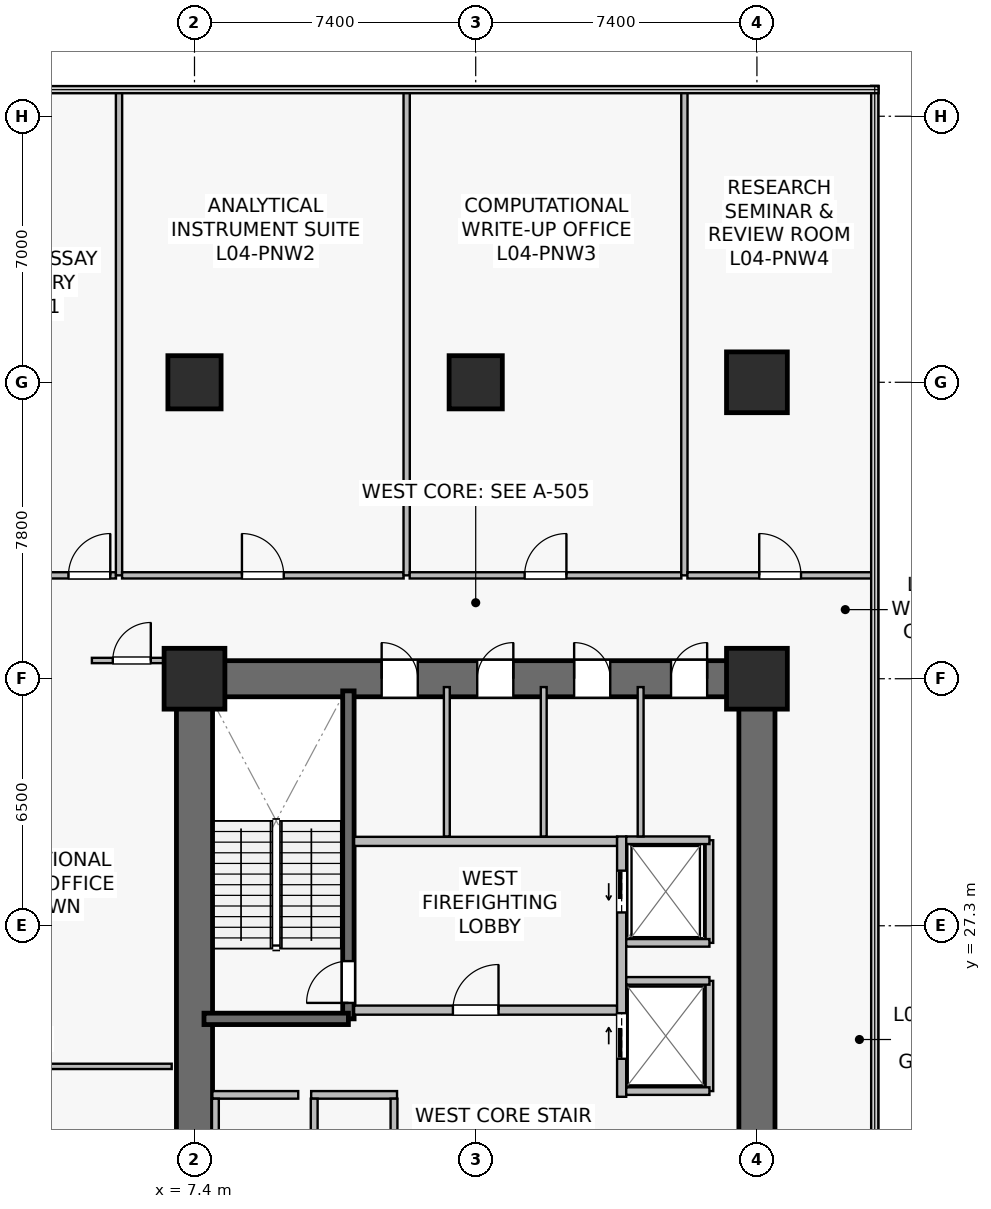
"""IFC4 building model, lengths in metres.
Left out: names, types, materials, properties, quantities, classifications, styles, units other than length and angle.
Written with IfcOpenShell. Run it as: python <this file> out.ifc"""

import sys

from ifc_helpers import new_model, si_unit, direction, frame, frame_2d, origin, origin_2d, place, context, subcontext, project, spatial, rectangle, extrude, source, transform, mapped, element, fill, save


model = new_model("IFC4")
c1 = context("Model", 3, precision=1e-05, world=origin(), true_north=direction((0.0, 1.0)))
c2 = subcontext(c1, "Body", "Model", "MODEL_VIEW")
j1 = project(units=[si_unit("LENGTHUNIT", "METRE"), si_unit("PLANEANGLEUNIT", "RADIAN")], contexts=[c1])
p1 = place(None, origin())
s1 = spatial("IfcSite", under=j1, at=p1, CompositionType="ELEMENT")
p2 = place(p1, origin())
s2 = spatial("IfcBuilding", under=s1, at=p2, CompositionType="ELEMENT")
p3 = place(p2, frame((0.0, 0.0, 15.0)))
s3 = spatial("IfcBuildingStorey", under=s2, at=p3, CompositionType="ELEMENT", Elevation=15.0)
p4 = place(p3, frame((6.925, 33.8, 0.0), z_axis=(0.0, 0.0, 1.0), x_axis=(1.0, 0.0, 0.0)))
e1 = element("IfcWall", 1, at=p4, inside=s3, PredefinedType="SHEAR", context=c2, shape_type="SweptSolid", body=[
    extrude(rectangle(XDim=15.75, YDim=0.95, at=frame_2d((7.875, 0.0))), origin(), (0.0, 0.0, 1.0), 4.45),
])
p5 = place(p4, frame((5.4, 0.0, 0.0)))
e2 = element("IfcOpeningElement", 2, at=p5, cuts=e1, PredefinedType="OPENING", context=c2, shape_type="SweptSolid", body=[
    extrude(rectangle(XDim=0.95, YDim=2.15, at=frame_2d((0.475, 1.075))), frame((0.0, 0.485, 0.0), z_axis=(0.0, -1.0, 0.0), x_axis=(1.0, 0.0, 0.0)), (0.0, 0.0, 1.0), 0.97),
])
p6 = place(p4, frame((7.915, 0.0, 0.0)))
e3 = element("IfcOpeningElement", 3, at=p6, cuts=e1, PredefinedType="OPENING", context=c2, shape_type="SweptSolid", body=[
    extrude(rectangle(XDim=0.95, YDim=2.15, at=frame_2d((0.475, 1.075))), frame((0.0, 0.485, 0.0), z_axis=(0.0, -1.0, 0.0), x_axis=(1.0, 0.0, 0.0)), (0.0, 0.0, 1.0), 0.97),
])
p7 = place(p4, frame((10.465, 0.0, 0.0)))
e4 = element("IfcOpeningElement", 4, at=p7, cuts=e1, PredefinedType="OPENING", context=c2, shape_type="SweptSolid", body=[
    extrude(rectangle(XDim=0.95, YDim=2.15, at=frame_2d((0.475, 1.075))), frame((0.0, 0.485, 0.0), z_axis=(0.0, -1.0, 0.0), x_axis=(1.0, 0.0, 0.0)), (0.0, 0.0, 1.0), 0.97),
])
p8 = place(p4, frame((13.015, 0.0, 0.0)))
e5 = element("IfcOpeningElement", 5, at=p8, cuts=e1, PredefinedType="OPENING", context=c2, shape_type="SweptSolid", body=[
    extrude(rectangle(XDim=0.95, YDim=2.15, at=frame_2d((0.475, 1.075))), frame((0.0, 0.485, 0.0), z_axis=(0.0, -1.0, 0.0), x_axis=(1.0, 0.0, 0.0)), (0.0, 0.0, 1.0), 0.97),
])
p9 = place(p3, frame((7.4, 15.275, 0.0), z_axis=(0.0, 0.0, 1.0), x_axis=(0.0, 1.0, 0.0)))
e6 = element("IfcWall", 6, at=p9, inside=s3, PredefinedType="SHEAR", context=c2, shape_type="SweptSolid", body=[
    extrude(rectangle(XDim=18.05, YDim=0.95, at=frame_2d((9.025, 0.0))), origin(), (0.0, 0.0, 1.0), 4.45),
])
p10 = place(p3, frame((22.2, 15.275, 0.0), z_axis=(0.0, 0.0, 1.0), x_axis=(0.0, 1.0, 0.0)))
e7 = element("IfcWall", 7, at=p10, inside=s3, PredefinedType="SHEAR", context=c2, shape_type="SweptSolid", body=[
    extrude(rectangle(XDim=18.05, YDim=0.95, at=frame_2d((9.025, 0.0))), origin(), (0.0, 0.0, 1.0), 4.45),
])
p11 = place(p10, frame((3.275, 0.0, 0.0)))
e8 = element("IfcOpeningElement", 8, at=p11, cuts=e7, PredefinedType="OPENING", context=c2, shape_type="SweptSolid", body=[
    extrude(rectangle(XDim=1.42, YDim=2.2, at=frame_2d((0.71, 1.1))), frame((0.0, 0.485, 0.0), z_axis=(0.0, -1.0, 0.0), x_axis=(1.0, 0.0, 0.0)), (0.0, 0.0, 1.0), 0.97),
])
p12 = place(p3, frame((11.45, 24.85, 0.0), z_axis=(0.0, 0.0, 1.0), x_axis=(0.0, 1.0, 0.0)))
e9 = element("IfcWall", 9, at=p12, inside=s3, PredefinedType="SHEAR", context=c2, shape_type="SweptSolid", body=[
    extrude(rectangle(XDim=8.63, YDim=0.3, at=frame_2d((4.315, 0.0))), origin(), (0.0, 0.0, 1.0), 4.45),
])
p13 = place(p12, frame((0.42, 0.0, 0.0)))
e10 = element("IfcOpeningElement", 10, at=p13, cuts=e9, PredefinedType="OPENING", context=c2, shape_type="SweptSolid", body=[
    extrude(rectangle(XDim=1.1, YDim=2.15, at=frame_2d((0.55, 1.075))), frame((0.0, 0.16, 0.0), z_axis=(0.0, -1.0, 0.0), x_axis=(1.0, 0.0, 0.0)), (0.0, 0.0, 1.0), 0.32),
])
p14 = place(p3, frame((7.65, 24.85, 0.0), z_axis=(0.0, 0.0, 1.0), x_axis=(1.0, 0.0, 0.0)))
e11 = element("IfcWall", 11, at=p14, inside=s3, PredefinedType="SHEAR", context=c2, shape_type="SweptSolid", body=[
    extrude(rectangle(XDim=3.8, YDim=0.3, at=frame_2d((1.9, 0.0))), origin(), (0.0, 0.0, 1.0), 4.45),
])
m1 = source(origin(), c2, "Body", "SweptSolid", [
    extrude(rectangle(XDim=1.6, YDim=1.6, at=origin_2d()), origin(), (0.0, 0.0, 1.0), 4.8),
])
for number, where, z_axis, x_axis in (
    (12, (7.4, 33.8, 0.0), (0.0, 0.0, 1.0), (1.0, 0.0, 0.0)),
    (13, (22.2, 33.8, 0.0), (0.0, 0.0, 1.0), (1.0, 0.0, 0.0)),
):
    element("IfcColumn", number, at=place(p3, frame(where, z_axis=z_axis, x_axis=x_axis)), inside=s3, PredefinedType="COLUMN", context=c2, shape_type="MappedRepresentation", body=[
        mapped(m1, transform((0.0, 0.0, 0.0), scale=1.0)),
    ])
m2 = source(origin(), c2, "Body", "SweptSolid", [
    extrude(rectangle(XDim=1.4, YDim=1.4, at=origin_2d()), origin(), (0.0, 0.0, 1.0), 4.8),
])
p15 = place(p3, frame((14.8, 41.6, 0.0), z_axis=(0.0, 0.0, 1.0), x_axis=(1.0, 0.0, 0.0)))
e14 = element("IfcColumn", 14, at=p15, inside=s3, PredefinedType="COLUMN", context=c2, shape_type="MappedRepresentation", body=[
    mapped(m2, transform((0.0, 0.0, 0.0), scale=1.0)),
])
p16 = place(p3, frame((22.2, 41.6, 0.0), z_axis=(0.0, 0.0, 1.0), x_axis=(1.0, 0.0, 0.0)))
e15 = element("IfcColumn", 15, at=p16, inside=s3, PredefinedType="COLUMN", context=c2, shape_type="MappedRepresentation", body=[
    mapped(m1, transform((0.0, 0.0, 0.0), scale=1.0)),
])
p17 = place(p3, frame((7.4, 41.6, 0.0), z_axis=(0.0, 0.0, 1.0), x_axis=(1.0, 0.0, 0.0)))
e16 = element("IfcColumn", 16, at=p17, inside=s3, PredefinedType="COLUMN", context=c2, shape_type="MappedRepresentation", body=[
    mapped(m2, transform((0.0, 0.0, 0.0), scale=1.0)),
])
p18 = place(p3, frame((11.6, 25.08, 0.0), z_axis=(0.0, 0.0, 1.0), x_axis=(1.0, 0.0, 0.0)))
e17 = element("IfcWall", 17, at=p18, inside=s3, PredefinedType="SOLIDWALL", context=c2, shape_type="SweptSolid", body=[
    extrude(rectangle(XDim=6.92, YDim=0.24, at=frame_2d((3.46, 0.0))), origin(), (0.0, 0.0, 1.0), 3.735),
])
p19 = place(p18, frame((2.6, 0.0, 0.0)))
e18 = element("IfcOpeningElement", 18, at=p19, cuts=e17, PredefinedType="OPENING", context=c2, shape_type="SweptSolid", body=[
    extrude(rectangle(XDim=1.2, YDim=2.16, at=frame_2d((0.6, 1.08))), frame((0.0, 0.13, 0.0), z_axis=(0.0, -1.0, 0.0), x_axis=(1.0, 0.0, 0.0)), (0.0, 0.0, 1.0), 0.26),
])
p20 = place(p3, frame((11.6, 29.52, 0.0), z_axis=(0.0, 0.0, 1.0), x_axis=(1.0, 0.0, 0.0)))
e19 = element("IfcWall", 19, at=p20, inside=s3, PredefinedType="SOLIDWALL", context=c2, shape_type="SweptSolid", body=[
    extrude(rectangle(XDim=6.92, YDim=0.24, at=frame_2d((3.46, 0.0))), origin(), (0.0, 0.0, 1.0), 3.735),
])
p21 = place(p3, frame((18.64, 22.8, 0.0), z_axis=(0.0, 0.0, 1.0), x_axis=(0.0, 1.0, 0.0)))
e20 = element("IfcWall", 20, at=p21, inside=s3, PredefinedType="SOLIDWALL", context=c2, shape_type="SweptSolid", body=[
    extrude(rectangle(XDim=6.85, YDim=0.24, at=frame_2d((3.425, 0.0))), origin(), (0.0, 0.0, 1.0), 3.535),
])
p22 = place(p21, frame((4.85, 0.0, 0.0)))
e21 = element("IfcOpeningElement", 21, at=p22, cuts=e20, PredefinedType="OPENING", context=c2, shape_type="SweptSolid", body=[
    extrude(rectangle(XDim=1.1, YDim=2.22, at=frame_2d((0.55, 1.11))), frame((0.0, 0.13, 0.0), z_axis=(0.0, -1.0, 0.0), x_axis=(1.0, 0.0, 0.0)), (0.0, 0.0, 1.0), 0.26),
])
p23 = place(p21, frame((1.0, 0.0, 0.0)))
e22 = element("IfcOpeningElement", 22, at=p23, cuts=e20, PredefinedType="OPENING", context=c2, shape_type="SweptSolid", body=[
    extrude(rectangle(XDim=1.2, YDim=2.22, at=frame_2d((0.6, 1.11))), frame((0.0, 0.13, 0.0), z_axis=(0.0, -1.0, 0.0), x_axis=(1.0, 0.0, 0.0)), (0.0, 0.0, 1.0), 0.26),
])
p24 = place(p3, frame((7.87, 22.85, 0.0), z_axis=(0.0, 0.0, 1.0), x_axis=(1.0, 0.0, 0.0)))
e23 = element("IfcWall", 23, at=p24, inside=s3, PredefinedType="SOLIDWALL", context=c2, shape_type="SweptSolid", body=[
    extrude(rectangle(XDim=2.26, YDim=0.2, at=frame_2d((1.13, 0.0))), origin(), (0.0, 0.0, 1.0), 4.45),
])
p25 = place(p3, frame((7.95, 20.85, 0.0), z_axis=(0.0, 0.0, 1.0), x_axis=(0.0, 1.0, 0.0)))
e24 = element("IfcWall", 24, at=p25, inside=s3, PredefinedType="SOLIDWALL", context=c2, shape_type="SweptSolid", body=[
    extrude(rectangle(XDim=1.9, YDim=0.18, at=frame_2d((0.95, 0.0))), origin(), (0.0, 0.0, 1.0), 4.45),
])
p26 = place(p3, frame((10.47, 22.85, 0.0), z_axis=(0.0, 0.0, 1.0), x_axis=(1.0, 0.0, 0.0)))
e25 = element("IfcWall", 25, at=p26, inside=s3, PredefinedType="SOLIDWALL", context=c2, shape_type="SweptSolid", body=[
    extrude(rectangle(XDim=2.26, YDim=0.2, at=frame_2d((1.13, 0.0))), origin(), (0.0, 0.0, 1.0), 4.45),
])
for number, where, z_axis, x_axis in (
    (26, (10.55, 20.85, 0.0), (0.0, 0.0, 1.0), (0.0, 1.0, 0.0)),
    (27, (12.65, 20.85, 0.0), (0.0, 0.0, 1.0), (0.0, 1.0, 0.0)),
):
    element("IfcWall", number, at=place(p3, frame(where, z_axis=z_axis, x_axis=x_axis)), inside=s3, PredefinedType="SOLIDWALL", context=c2, shape_type="SweptSolid", body=[
        extrude(rectangle(XDim=1.9, YDim=0.18, at=frame_2d((0.95, 0.0))), origin(), (0.0, 0.0, 1.0), 4.45),
    ])
p27 = place(p3, frame((20.95, 26.85, 0.0), z_axis=(0.0, 0.0, 1.0), x_axis=(0.0, 1.0, 0.0)))
e28 = element("IfcWall", 28, at=p27, inside=s3, PredefinedType="SOLIDWALL", context=c2, shape_type="SweptSolid", body=[
    extrude(rectangle(XDim=2.7, YDim=0.2, at=frame_2d((1.35, 0.0))), origin(), (0.0, 0.0, 1.0), 4.45),
])
p28 = place(p3, frame((18.76, 29.55, 0.0), z_axis=(0.0, 0.0, 1.0), x_axis=(1.0, 0.0, 0.0)))
e29 = element("IfcWall", 29, at=p28, inside=s3, PredefinedType="SOLIDWALL", context=c2, shape_type="SweptSolid", body=[
    extrude(rectangle(XDim=2.19, YDim=0.2, at=frame_2d((1.095, 0.0))), origin(), (0.0, 0.0, 1.0), 4.45),
])
p29 = place(p3, frame((18.76, 26.85, 0.0), z_axis=(0.0, 0.0, 1.0), x_axis=(1.0, 0.0, 0.0)))
e30 = element("IfcWall", 30, at=p29, inside=s3, PredefinedType="SOLIDWALL", context=c2, shape_type="SweptSolid", body=[
    extrude(rectangle(XDim=2.19, YDim=0.2, at=frame_2d((1.095, 0.0))), origin(), (0.0, 0.0, 1.0), 3.847),
])
p30 = place(p3, frame((20.95, 22.95, 0.0), z_axis=(0.0, 0.0, 1.0), x_axis=(0.0, 1.0, 0.0)))
e31 = element("IfcWall", 31, at=p30, inside=s3, PredefinedType="SOLIDWALL", context=c2, shape_type="SweptSolid", body=[
    extrude(rectangle(XDim=2.9, YDim=0.2, at=frame_2d((1.45, 0.0))), origin(), (0.0, 0.0, 1.0), 3.535),
])
for number, where, z_axis, x_axis in (
    (32, (18.76, 25.85, 0.0), (0.0, 0.0, 1.0), (1.0, 0.0, 0.0)),
    (33, (18.76, 22.95, 0.0), (0.0, 0.0, 1.0), (1.0, 0.0, 0.0)),
):
    element("IfcWall", number, at=place(p3, frame(where, z_axis=z_axis, x_axis=x_axis)), inside=s3, PredefinedType="SOLIDWALL", context=c2, shape_type="SweptSolid", body=[
        extrude(rectangle(XDim=2.19, YDim=0.2, at=frame_2d((1.095, 0.0))), origin(), (0.0, 0.0, 1.0), 4.45),
    ])
for number, where, z_axis, x_axis in (
    (34, (14.04, 29.65, 0.0), (0.0, 0.0, 1.0), (0.0, 1.0, 0.0)),
    (35, (16.59, 29.65, 0.0), (0.0, 0.0, 1.0), (0.0, 1.0, 0.0)),
    (36, (19.14, 29.65, 0.0), (0.0, 0.0, 1.0), (0.0, 1.0, 0.0)),
):
    element("IfcWall", number, at=place(p3, frame(where, z_axis=z_axis, x_axis=x_axis)), inside=s3, PredefinedType="PLUMBINGWALL", context=c2, shape_type="SweptSolid", body=[
        extrude(rectangle(XDim=3.93, YDim=0.155, at=frame_2d((1.965, 0.0))), origin(), (0.0, 0.0, 1.0), 4.45),
    ])
p31 = place(p3, frame((-0.85, 23.6, 0.0), z_axis=(0.0, 0.0, 1.0), x_axis=(1.0, 0.0, 0.0)))
e37 = element("IfcWall", 37, at=p31, inside=s3, PredefinedType="PARTITIONING", context=c2, shape_type="SweptSolid", body=[
    extrude(rectangle(XDim=7.65, YDim=0.14, at=frame_2d((3.825, 0.0))), origin(), (0.0, 0.0, 1.0), 3.835),
])
p32 = place(p3, frame((4.7, 34.28, 0.0), z_axis=(0.0, 0.0, 1.0), x_axis=(1.0, 0.0, 0.0)))
e38 = element("IfcWall", 38, at=p32, inside=s3, PredefinedType="PARTITIONING", context=c2, shape_type="SweptSolid", body=[
    extrude(rectangle(XDim=2.1, YDim=0.14, at=frame_2d((1.05, 0.0))), origin(), (0.0, 0.0, 1.0), 4.45),
])
p33 = place(p32, frame((0.55, 0.0, 0.0)))
e39 = element("IfcOpeningElement", 39, at=p33, cuts=e38, PredefinedType="OPENING", context=c2, shape_type="SweptSolid", body=[
    extrude(rectangle(XDim=1.0, YDim=2.15, at=frame_2d((0.5, 1.075))), frame((0.0, 0.08, 0.0), z_axis=(0.0, -1.0, 0.0), x_axis=(1.0, 0.0, 0.0)), (0.0, 0.0, 1.0), 0.16),
])
p34 = place(p3, frame((-0.85, 36.52, 0.0), z_axis=(0.0, 0.0, 1.0), x_axis=(1.0, 0.0, 0.0)))
e40 = element("IfcWall", 40, at=p34, inside=s3, PredefinedType="PARTITIONING", context=c2, shape_type="SweptSolid", body=[
    extrude(rectangle(XDim=6.184, YDim=0.165, at=frame_2d((3.092, 0.0))), origin(), (0.0, 0.0, 1.0), 3.835),
])
p35 = place(p34, frame((4.934, 0.0, 0.0)))
e41 = element("IfcOpeningElement", 41, at=p35, cuts=e40, PredefinedType="OPENING", context=c2, shape_type="SweptSolid", body=[
    extrude(rectangle(XDim=1.1, YDim=2.18, at=frame_2d((0.55, 1.09))), frame((0.0, 0.093, 0.0), z_axis=(0.0, -1.0, 0.0), x_axis=(1.0, 0.0, 0.0)), (0.0, 0.0, 1.0), 0.185),
])
p36 = place(p3, frame((5.414, 36.52, 0.0), z_axis=(0.0, 0.0, 1.0), x_axis=(0.0, 1.0, 0.0)))
e42 = element("IfcWall", 42, at=p36, inside=s3, PredefinedType="PARTITIONING", context=c2, shape_type="SweptSolid", body=[
    extrude(rectangle(XDim=12.77, YDim=0.165, at=frame_2d((6.385, 0.0))), origin(), (0.0, 0.0, 1.0), 3.635),
])
p37 = place(p3, frame((5.494, 36.52, 0.0), z_axis=(0.0, 0.0, 1.0), x_axis=(1.0, 0.0, 0.0)))
e43 = element("IfcWall", 43, at=p37, inside=s3, PredefinedType="PARTITIONING", context=c2, shape_type="SweptSolid", body=[
    extrude(rectangle(XDim=7.409, YDim=0.165, at=frame_2d((3.705, 0.0))), origin(), (0.0, 0.0, 1.0), 3.735),
])
p38 = place(p37, frame((3.155, 0.0, 0.0)))
e44 = element("IfcOpeningElement", 44, at=p38, cuts=e43, PredefinedType="OPENING", context=c2, shape_type="SweptSolid", body=[
    extrude(rectangle(XDim=1.1, YDim=2.18, at=frame_2d((0.55, 1.09))), frame((0.0, 0.093, 0.0), z_axis=(0.0, -1.0, 0.0), x_axis=(1.0, 0.0, 0.0)), (0.0, 0.0, 1.0), 0.185),
])
p39 = place(p3, frame((12.983, 36.52, 0.0), z_axis=(0.0, 0.0, 1.0), x_axis=(0.0, 1.0, 0.0)))
e45 = element("IfcWall", 45, at=p39, inside=s3, PredefinedType="PARTITIONING", context=c2, shape_type="SweptSolid", body=[
    extrude(rectangle(XDim=12.77, YDim=0.165, at=frame_2d((6.385, 0.0))), origin(), (0.0, 0.0, 1.0), 3.635),
])
p40 = place(p3, frame((13.063, 36.52, 0.0), z_axis=(0.0, 0.0, 1.0), x_axis=(1.0, 0.0, 0.0)))
e46 = element("IfcWall", 46, at=p40, inside=s3, PredefinedType="PARTITIONING", context=c2, shape_type="SweptSolid", body=[
    extrude(rectangle(XDim=7.148, YDim=0.165, at=frame_2d((3.574, 0.0))), origin(), (0.0, 0.0, 1.0), 3.735),
])
p41 = place(p40, frame((3.024, 0.0, 0.0)))
e47 = element("IfcOpeningElement", 47, at=p41, cuts=e46, PredefinedType="OPENING", context=c2, shape_type="SweptSolid", body=[
    extrude(rectangle(XDim=1.1, YDim=2.18, at=frame_2d((0.55, 1.09))), frame((0.0, 0.093, 0.0), z_axis=(0.0, -1.0, 0.0), x_axis=(1.0, 0.0, 0.0)), (0.0, 0.0, 1.0), 0.185),
])
p42 = place(p3, frame((20.291, 36.52, 0.0), z_axis=(0.0, 0.0, 1.0), x_axis=(0.0, 1.0, 0.0)))
e48 = element("IfcWall", 48, at=p42, inside=s3, PredefinedType="PARTITIONING", context=c2, shape_type="SweptSolid", body=[
    extrude(rectangle(XDim=12.77, YDim=0.165, at=frame_2d((6.385, 0.0))), origin(), (0.0, 0.0, 1.0), 3.635),
])
p43 = place(p3, frame((20.371, 36.52, 0.0), z_axis=(0.0, 0.0, 1.0), x_axis=(1.0, 0.0, 0.0)))
e49 = element("IfcWall", 49, at=p43, inside=s3, PredefinedType="PARTITIONING", context=c2, shape_type="SweptSolid", body=[
    extrude(rectangle(XDim=4.879, YDim=0.165, at=frame_2d((2.439, 0.0))), origin(), (0.0, 0.0, 1.0), 3.735),
])
p44 = place(p43, frame((1.889, 0.0, 0.0)))
e50 = element("IfcOpeningElement", 50, at=p44, cuts=e49, PredefinedType="OPENING", context=c2, shape_type="SweptSolid", body=[
    extrude(rectangle(XDim=1.1, YDim=2.18, at=frame_2d((0.55, 1.09))), frame((0.0, 0.093, 0.0), z_axis=(0.0, -1.0, 0.0), x_axis=(1.0, 0.0, 0.0)), (0.0, 0.0, 1.0), 0.185),
])
m3 = source(origin(), c2, "Body", "SweptSolid", [
    extrude(rectangle(XDim=1.1, YDim=2.15, at=frame_2d((0.55, 1.075))), frame((0.0, 0.025, 0.0), z_axis=(0.0, -1.0, 0.0), x_axis=(1.0, 0.0, 0.0)), (0.0, 0.0, 1.0), 0.05),
])
p45 = place(p13, origin())
e51 = element("IfcDoor", 51, at=p45, inside=s3, OperationType="SINGLE_SWING_LEFT", PredefinedType="DOOR", context=c2, shape_type="MappedRepresentation", body=[
    mapped(m3, transform((0.0, 0.0, 0.0), scale=1.0)),
])
fill(e10, e51)
m4 = source(origin(), c2, "Body", "SweptSolid", [
    extrude(rectangle(XDim=1.2, YDim=2.16, at=frame_2d((0.6, 1.08))), frame((0.0, 0.025, 0.0), z_axis=(0.0, -1.0, 0.0), x_axis=(1.0, 0.0, 0.0)), (0.0, 0.0, 1.0), 0.05),
])
p46 = place(p19, origin())
e52 = element("IfcDoor", 52, at=p46, inside=s3, OperationType="SINGLE_SWING_RIGHT", PredefinedType="DOOR", context=c2, shape_type="MappedRepresentation", body=[
    mapped(m4, transform((0.0, 0.0, 0.0), scale=1.0)),
])
fill(e18, e52)
m5 = source(origin(), c2, "Body", "SweptSolid", [
    extrude(rectangle(XDim=1.1, YDim=2.22, at=frame_2d((0.55, 1.11))), frame((0.0, 0.025, 0.0), z_axis=(0.0, -1.0, 0.0), x_axis=(1.0, 0.0, 0.0)), (0.0, 0.0, 1.0), 0.05),
])
p47 = place(p22, origin())
e53 = element("IfcDoor", 53, at=p47, inside=s3, OperationType="SLIDING_TO_LEFT", PredefinedType="USERDEFINED", context=c2, shape_type="MappedRepresentation", body=[
    mapped(m5, transform((0.0, 0.0, 0.0), scale=1.0)),
])
fill(e21, e53)
m6 = source(origin(), c2, "Body", "SweptSolid", [
    extrude(rectangle(XDim=1.2, YDim=2.22, at=frame_2d((0.6, 1.11))), frame((0.0, 0.025, 0.0), z_axis=(0.0, -1.0, 0.0), x_axis=(1.0, 0.0, 0.0)), (0.0, 0.0, 1.0), 0.05),
])
p48 = place(p23, origin())
e54 = element("IfcDoor", 54, at=p48, inside=s3, OperationType="SLIDING_TO_RIGHT", PredefinedType="USERDEFINED", context=c2, shape_type="MappedRepresentation", body=[
    mapped(m6, transform((0.0, 0.0, 0.0), scale=1.0)),
])
fill(e22, e54)
m7 = source(origin(), c2, "Body", "SweptSolid", [
    extrude(rectangle(XDim=0.95, YDim=2.15, at=frame_2d((0.475, 1.075))), frame((0.0, 0.025, 0.0), z_axis=(0.0, -1.0, 0.0), x_axis=(1.0, 0.0, 0.0)), (0.0, 0.0, 1.0), 0.05),
])
p49 = place(p5, origin())
e55 = element("IfcDoor", 55, at=p49, inside=s3, OperationType="SINGLE_SWING_LEFT", PredefinedType="DOOR", context=c2, shape_type="MappedRepresentation", body=[
    mapped(m7, transform((0.0, 0.0, 0.0), scale=1.0)),
])
fill(e2, e55)
p50 = place(p6, origin())
e56 = element("IfcDoor", 56, at=p50, inside=s3, OperationType="SINGLE_SWING_RIGHT", PredefinedType="DOOR", context=c2, shape_type="MappedRepresentation", body=[
    mapped(m7, transform((0.0, 0.0, 0.0), scale=1.0)),
])
fill(e3, e56)
p51 = place(p7, origin())
e57 = element("IfcDoor", 57, at=p51, inside=s3, OperationType="SINGLE_SWING_LEFT", PredefinedType="DOOR", context=c2, shape_type="MappedRepresentation", body=[
    mapped(m7, transform((0.0, 0.0, 0.0), scale=1.0)),
])
fill(e4, e57)
p52 = place(p8, origin())
e58 = element("IfcDoor", 58, at=p52, inside=s3, OperationType="SINGLE_SWING_RIGHT", PredefinedType="DOOR", context=c2, shape_type="MappedRepresentation", body=[
    mapped(m7, transform((0.0, 0.0, 0.0), scale=1.0)),
])
fill(e5, e58)
m8 = source(origin(), c2, "Body", "SweptSolid", [
    extrude(rectangle(XDim=1.0, YDim=2.15, at=frame_2d((0.5, 1.075))), frame((0.0, 0.025, 0.0), z_axis=(0.0, -1.0, 0.0), x_axis=(1.0, 0.0, 0.0)), (0.0, 0.0, 1.0), 0.05),
])
p53 = place(p33, origin())
e59 = element("IfcDoor", 59, at=p53, inside=s3, OperationType="SINGLE_SWING_RIGHT", PredefinedType="DOOR", context=c2, shape_type="MappedRepresentation", body=[
    mapped(m8, transform((0.0, 0.0, 0.0), scale=1.0)),
])
fill(e39, e59)
m9 = source(origin(), c2, "Body", "SweptSolid", [
    extrude(rectangle(XDim=1.1, YDim=2.18, at=frame_2d((0.55, 1.09))), frame((0.0, 0.025, 0.0), z_axis=(0.0, -1.0, 0.0), x_axis=(1.0, 0.0, 0.0)), (0.0, 0.0, 1.0), 0.05),
])
p54 = place(p35, origin())
e60 = element("IfcDoor", 60, at=p54, inside=s3, OperationType="SINGLE_SWING_RIGHT", PredefinedType="DOOR", context=c2, shape_type="MappedRepresentation", body=[
    mapped(m9, transform((0.0, 0.0, 0.0), scale=1.0)),
])
fill(e41, e60)
p55 = place(p38, origin())
e61 = element("IfcDoor", 61, at=p55, inside=s3, OperationType="SINGLE_SWING_LEFT", PredefinedType="DOOR", context=c2, shape_type="MappedRepresentation", body=[
    mapped(m9, transform((0.0, 0.0, 0.0), scale=1.0)),
])
fill(e44, e61)
p56 = place(p41, origin())
e62 = element("IfcDoor", 62, at=p56, inside=s3, OperationType="SINGLE_SWING_RIGHT", PredefinedType="DOOR", context=c2, shape_type="MappedRepresentation", body=[
    mapped(m9, transform((0.0, 0.0, 0.0), scale=1.0)),
])
fill(e47, e62)
p57 = place(p44, origin())
e63 = element("IfcDoor", 63, at=p57, inside=s3, OperationType="SINGLE_SWING_LEFT", PredefinedType="DOOR", context=c2, shape_type="MappedRepresentation", body=[
    mapped(m9, transform((0.0, 0.0, 0.0), scale=1.0)),
])
fill(e50, e63)
save(model, sys.argv[1])
